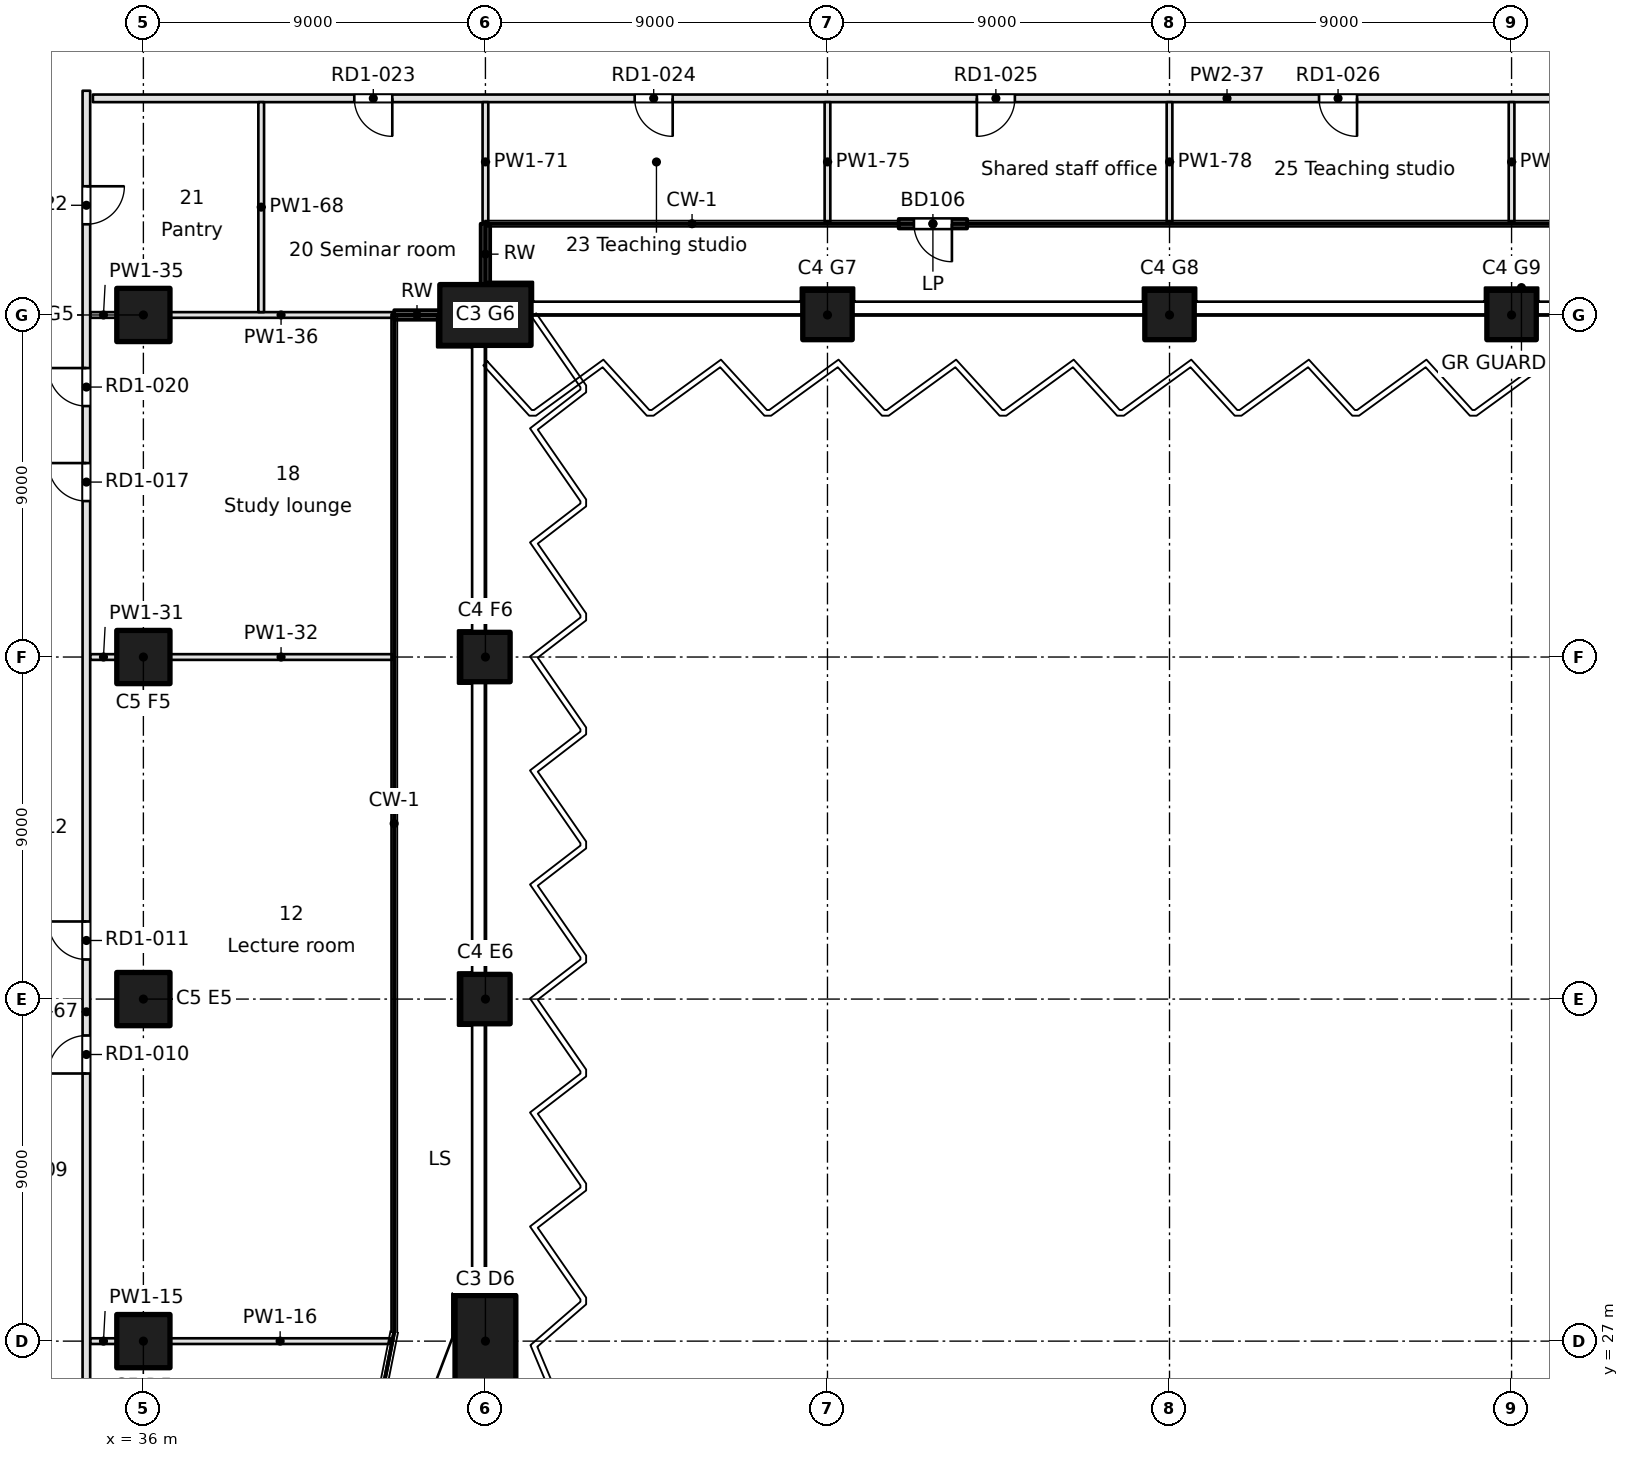
"""IFC4 building model, lengths in metres.
Left out: names, types, materials, properties, quantities, classifications, styles, units other than length and angle.
Written with IfcOpenShell. Run it as: python <this file> out.ifc"""

import sys

from ifc_helpers import new_model, si_unit, direction, frame, frame_2d, origin, origin_2d, place, context, subcontext, project, spatial, rectangle, extrude, element, fill, save


model = new_model("IFC4")
c1 = context("Model", 3, precision=1e-05, world=origin(), true_north=direction((0.0, 1.0)))
c2 = subcontext(c1, "Body", "Model", "MODEL_VIEW")
j1 = project(units=[si_unit("LENGTHUNIT", "METRE"), si_unit("PLANEANGLEUNIT", "RADIAN")], contexts=[c1])
p1 = place(None, origin())
s1 = spatial("IfcSite", under=j1, at=p1, CompositionType="ELEMENT")
p2 = place(p1, origin())
s2 = spatial("IfcBuilding", under=s1, at=p2, CompositionType="ELEMENT")
p3 = place(p2, frame((0.0, 0.0, 46.9)))
s3 = spatial("IfcBuildingStorey", under=s2, at=p3, CompositionType="ELEMENT", Elevation=46.9)
p4 = place(p3, frame((45.0, 27.0, 0.0), z_axis=(0.0, 0.0, 1.0), x_axis=(0.0, 1.0, 0.0)))
e1 = element("IfcColumn", 1, at=p4, inside=s3, PredefinedType="COLUMN", context=c2, shape_type="SweptSolid", body=[
    extrude(rectangle(XDim=2.4, YDim=1.6, at=origin_2d()), origin(), (0.0, 0.0, 1.0), 3.7),
])
for number, where, z_axis, x_axis in (
    (2, (45.0, 36.0, 0.0), (0.0, 0.0, 1.0), (1.0, 0.0, 0.0)),
    (3, (45.0, 45.0, 0.0), (0.0, 0.0, 1.0), (1.0, 0.0, 0.0)),
):
    element("IfcColumn", number, at=place(p3, frame(where, z_axis=z_axis, x_axis=x_axis)), inside=s3, PredefinedType="COLUMN", context=c2, shape_type="SweptSolid", body=[
        extrude(rectangle(XDim=1.3, YDim=1.3, at=origin_2d()), origin(), (0.0, 0.0, 1.0), 3.7),
    ])
p5 = place(p3, frame((45.0, 54.0, 0.0), z_axis=(0.0, 0.0, 1.0), x_axis=(1.0, 0.0, 0.0)))
e4 = element("IfcColumn", 4, at=p5, inside=s3, PredefinedType="COLUMN", context=c2, shape_type="SweptSolid", body=[
    extrude(rectangle(XDim=2.4, YDim=1.6, at=origin_2d()), origin(), (0.0, 0.0, 1.0), 3.7),
])
for number, where, z_axis, x_axis in (
    (5, (54.0, 54.0, 0.0), (0.0, 0.0, 1.0), (1.0, 0.0, 0.0)),
    (6, (63.0, 54.0, 0.0), (0.0, 0.0, 1.0), (1.0, 0.0, 0.0)),
    (7, (72.0, 54.0, 0.0), (0.0, 0.0, 1.0), (1.0, 0.0, 0.0)),
):
    element("IfcColumn", number, at=place(p3, frame(where, z_axis=z_axis, x_axis=x_axis)), inside=s3, PredefinedType="COLUMN", context=c2, shape_type="SweptSolid", body=[
        extrude(rectangle(XDim=1.3, YDim=1.3, at=origin_2d()), origin(), (0.0, 0.0, 1.0), 3.7),
    ])
for number, where, z_axis, x_axis in (
    (8, (36.0, 27.0, 0.0), (0.0, 0.0, 1.0), (1.0, 0.0, 0.0)),
    (9, (36.0, 36.0, 0.0), (0.0, 0.0, 1.0), (1.0, 0.0, 0.0)),
    (10, (36.0, 45.0, 0.0), (0.0, 0.0, 1.0), (1.0, 0.0, 0.0)),
    (11, (36.0, 54.0, 0.0), (0.0, 0.0, 1.0), (1.0, 0.0, 0.0)),
):
    element("IfcColumn", number, at=place(p3, frame(where, z_axis=z_axis, x_axis=x_axis)), inside=s3, PredefinedType="COLUMN", context=c2, shape_type="SweptSolid", body=[
        extrude(rectangle(XDim=1.4, YDim=1.4, at=origin_2d()), origin(), (0.0, 0.0, 1.0), 3.7),
    ])
p6 = place(p3, frame((42.599, 54.0, 0.0), z_axis=(0.0, 0.0, 1.0), x_axis=(0.999999917344, 0.000406586671, 0.0)))
e12 = element("IfcWall", 12, at=p6, inside=s3, PredefinedType="SOLIDWALL", context=c2, shape_type="SweptSolid", body=[
    extrude(rectangle(XDim=1.201, YDim=0.25, at=frame_2d((0.601, 0.0))), origin(), (0.0, 0.0, 1.0), 3.3),
])
p7 = place(p3, frame((44.999, 54.8, 0.0), z_axis=(0.0, 0.0, 1.0), x_axis=(0.000152508767, 0.999999988371, 0.0)))
e13 = element("IfcWall", 13, at=p7, inside=s3, PredefinedType="SOLIDWALL", context=c2, shape_type="SweptSolid", body=[
    extrude(rectangle(XDim=1.601, YDim=0.25, at=frame_2d((0.8, 0.0))), origin(), (0.0, 0.0, 1.0), 3.3),
])
p8 = place(p3, frame((55.874, 56.401, 0.0), z_axis=(0.0, 0.0, 1.0), x_axis=(1.0, 0.0, 0.0)))
e14 = element("IfcWall", 14, at=p8, inside=s3, PredefinedType="SOLIDWALL", context=c2, shape_type="SweptSolid", body=[
    extrude(rectangle(XDim=1.8, YDim=0.25, at=frame_2d((0.9, 0.0))), origin(), (0.0, 0.0, 1.0), 3.3),
])
p9 = place(p8, frame((0.4, 0.0, 0.0)))
e15 = element("IfcOpeningElement", 15, at=p9, cuts=e14, PredefinedType="OPENING", context=c2, shape_type="SweptSolid", body=[
    extrude(rectangle(XDim=1.0, YDim=2.1, at=frame_2d((0.5, 1.05))), frame((0.0, 0.125, 0.0), z_axis=(0.0, -1.0, 0.0), x_axis=(1.0, 0.0, 0.0)), (0.0, 0.0, 1.0), 0.25),
])
p10 = place(p3, frame((34.6, 27.0, 0.0), z_axis=(0.0, 0.0, 1.0), x_axis=(1.0, 0.0, 0.0)))
e16 = element("IfcWall", 16, at=p10, inside=s3, PredefinedType="PARTITIONING", context=c2, shape_type="SweptSolid", body=[
    extrude(rectangle(XDim=0.7, YDim=0.15, at=frame_2d((0.35, 0.0))), origin(), (0.0, 0.0, 1.0), 3.3),
])
p11 = place(p3, frame((36.7, 27.0, 0.0), z_axis=(0.0, 0.0, 1.0), x_axis=(1.0, 0.0, 0.0)))
e17 = element("IfcWall", 17, at=p11, inside=s3, PredefinedType="PARTITIONING", context=c2, shape_type="SweptSolid", body=[
    extrude(rectangle(XDim=5.797, YDim=0.15, at=frame_2d((2.898, 0.0))), origin(), (0.0, 0.0, 1.0), 3.3),
])
p12 = place(p3, frame((34.6, 45.0, 0.0), z_axis=(0.0, 0.0, 1.0), x_axis=(1.0, 0.0, 0.0)))
e18 = element("IfcWall", 18, at=p12, inside=s3, PredefinedType="PARTITIONING", context=c2, shape_type="SweptSolid", body=[
    extrude(rectangle(XDim=0.7, YDim=0.15, at=frame_2d((0.35, 0.0))), origin(), (0.0, 0.0, 1.0), 3.3),
])
p13 = place(p3, frame((36.7, 45.0, 0.0), z_axis=(0.0, 0.0, 1.0), x_axis=(1.0, 0.0, 0.0)))
e19 = element("IfcWall", 19, at=p13, inside=s3, PredefinedType="PARTITIONING", context=c2, shape_type="SweptSolid", body=[
    extrude(rectangle(XDim=5.845, YDim=0.15, at=frame_2d((2.922, 0.0))), origin(), (0.0, 0.0, 1.0), 3.3),
])
p14 = place(p3, frame((34.6, 54.0, 0.0), z_axis=(0.0, 0.0, 1.0), x_axis=(1.0, 0.0, 0.0)))
e20 = element("IfcWall", 20, at=p14, inside=s3, PredefinedType="PARTITIONING", context=c2, shape_type="SweptSolid", body=[
    extrude(rectangle(XDim=0.7, YDim=0.15, at=frame_2d((0.35, 0.0))), origin(), (0.0, 0.0, 1.0), 3.3),
])
p15 = place(p3, frame((36.7, 54.0, 0.0), z_axis=(0.0, 0.0, 1.0), x_axis=(1.0, 0.0, 0.0)))
e21 = element("IfcWall", 21, at=p15, inside=s3, PredefinedType="PARTITIONING", context=c2, shape_type="SweptSolid", body=[
    extrude(rectangle(XDim=5.845, YDim=0.15, at=frame_2d((2.922, 0.0))), origin(), (0.0, 0.0, 1.0), 3.3),
])
p16 = place(p3, frame((94.354, 59.7, 0.0), z_axis=(0.0, 0.0, 1.0), x_axis=(-1.0, 0.0, 0.0)))
e22 = element("IfcWall", 22, at=p16, inside=s3, PredefinedType="PARTITIONING", context=c2, shape_type="SweptSolid", body=[
    extrude(rectangle(XDim=59.682, YDim=0.2, at=frame_2d((29.841, 0.0))), origin(), (0.0, 0.0, 1.0), 3.3),
])
p17 = place(p16, frame((51.805, 0.0, 0.0)))
e23 = element("IfcOpeningElement", 23, at=p17, cuts=e22, PredefinedType="OPENING", context=c2, shape_type="SweptSolid", body=[
    extrude(rectangle(XDim=1.0, YDim=2.1, at=frame_2d((0.5, 1.05))), frame((0.0, 0.1, 0.0), z_axis=(0.0, -1.0, 0.0), x_axis=(1.0, 0.0, 0.0)), (0.0, 0.0, 1.0), 0.2),
])
p18 = place(p16, frame((44.427, 0.0, 0.0)))
e24 = element("IfcOpeningElement", 24, at=p18, cuts=e22, PredefinedType="OPENING", context=c2, shape_type="SweptSolid", body=[
    extrude(rectangle(XDim=1.0, YDim=2.1, at=frame_2d((0.5, 1.05))), frame((0.0, 0.1, 0.0), z_axis=(0.0, -1.0, 0.0), x_axis=(1.0, 0.0, 0.0)), (0.0, 0.0, 1.0), 0.2),
])
p19 = place(p16, frame((35.423, 0.0, 0.0)))
e25 = element("IfcOpeningElement", 25, at=p19, cuts=e22, PredefinedType="OPENING", context=c2, shape_type="SweptSolid", body=[
    extrude(rectangle(XDim=1.0, YDim=2.1, at=frame_2d((0.5, 1.05))), frame((0.0, 0.1, 0.0), z_axis=(0.0, -1.0, 0.0), x_axis=(1.0, 0.0, 0.0)), (0.0, 0.0, 1.0), 0.2),
])
p20 = place(p16, frame((26.42, 0.0, 0.0)))
e26 = element("IfcOpeningElement", 26, at=p20, cuts=e22, PredefinedType="OPENING", context=c2, shape_type="SweptSolid", body=[
    extrude(rectangle(XDim=1.0, YDim=2.1, at=frame_2d((0.5, 1.05))), frame((0.0, 0.1, 0.0), z_axis=(0.0, -1.0, 0.0), x_axis=(1.0, 0.0, 0.0)), (0.0, 0.0, 1.0), 0.2),
])
p21 = place(p16, frame((10.664, 0.0, 0.0)))
e27 = element("IfcOpeningElement", 27, at=p21, cuts=e22, PredefinedType="OPENING", context=c2, shape_type="SweptSolid", body=[
    extrude(rectangle(XDim=1.0, YDim=2.1, at=frame_2d((0.5, 1.05))), frame((0.0, 0.1, 0.0), z_axis=(0.0, -1.0, 0.0), x_axis=(1.0, 0.0, 0.0)), (0.0, 0.0, 1.0), 0.2),
])
p22 = place(p3, frame((34.5, 59.9, 0.0), z_axis=(0.0, 0.0, 1.0), x_axis=(0.0, -1.0, 0.0)))
e28 = element("IfcWall", 28, at=p22, inside=s3, PredefinedType="PARTITIONING", context=c2, shape_type="SweptSolid", body=[
    extrude(rectangle(XDim=48.47, YDim=0.2, at=frame_2d((24.235, 0.0))), origin(), (0.0, 0.0, 1.0), 3.3),
])
p23 = place(p22, frame((44.179, 0.0, 0.0)))
e29 = element("IfcOpeningElement", 29, at=p23, cuts=e28, PredefinedType="OPENING", context=c2, shape_type="SweptSolid", body=[
    extrude(rectangle(XDim=1.8, YDim=2.1, at=frame_2d((0.9, 1.05))), frame((0.0, 0.1, 0.0), z_axis=(0.0, -1.0, 0.0), x_axis=(1.0, 0.0, 0.0)), (0.0, 0.0, 1.0), 0.2),
])
p24 = place(p22, frame((36.92, 0.0, 0.0)))
e30 = element("IfcOpeningElement", 30, at=p24, cuts=e28, PredefinedType="OPENING", context=c2, shape_type="SweptSolid", body=[
    extrude(rectangle(XDim=1.0, YDim=2.1, at=frame_2d((0.5, 1.05))), frame((0.0, 0.1, 0.0), z_axis=(0.0, -1.0, 0.0), x_axis=(1.0, 0.0, 0.0)), (0.0, 0.0, 1.0), 0.2),
])
p25 = place(p22, frame((24.858, 0.0, 0.0)))
e31 = element("IfcOpeningElement", 31, at=p25, cuts=e28, PredefinedType="OPENING", context=c2, shape_type="SweptSolid", body=[
    extrude(rectangle(XDim=1.0, YDim=2.1, at=frame_2d((0.5, 1.05))), frame((0.0, 0.1, 0.0), z_axis=(0.0, -1.0, 0.0), x_axis=(1.0, 0.0, 0.0)), (0.0, 0.0, 1.0), 0.2),
])
p26 = place(p22, frame((21.858, 0.0, 0.0)))
e32 = element("IfcOpeningElement", 32, at=p26, cuts=e28, PredefinedType="OPENING", context=c2, shape_type="SweptSolid", body=[
    extrude(rectangle(XDim=1.0, YDim=2.1, at=frame_2d((0.5, 1.05))), frame((0.0, 0.1, 0.0), z_axis=(0.0, -1.0, 0.0), x_axis=(1.0, 0.0, 0.0)), (0.0, 0.0, 1.0), 0.2),
])
p27 = place(p22, frame((9.797, 0.0, 0.0)))
e33 = element("IfcOpeningElement", 33, at=p27, cuts=e28, PredefinedType="OPENING", context=c2, shape_type="SweptSolid", body=[
    extrude(rectangle(XDim=1.0, YDim=2.1, at=frame_2d((0.5, 1.05))), frame((0.0, 0.1, 0.0), z_axis=(0.0, -1.0, 0.0), x_axis=(1.0, 0.0, 0.0)), (0.0, 0.0, 1.0), 0.2),
])
p28 = place(p22, frame((7.297, 0.0, 0.0)))
e34 = element("IfcOpeningElement", 34, at=p28, cuts=e28, PredefinedType="OPENING", context=c2, shape_type="SweptSolid", body=[
    extrude(rectangle(XDim=1.0, YDim=2.1, at=frame_2d((0.5, 1.05))), frame((0.0, 0.1, 0.0), z_axis=(0.0, -1.0, 0.0), x_axis=(1.0, 0.0, 0.0)), (0.0, 0.0, 1.0), 0.2),
])
p29 = place(p22, frame((2.514, 0.0, 0.0)))
e35 = element("IfcOpeningElement", 35, at=p29, cuts=e28, PredefinedType="OPENING", context=c2, shape_type="SweptSolid", body=[
    extrude(rectangle(XDim=1.0, YDim=2.1, at=frame_2d((0.5, 1.05))), frame((0.0, 0.1, 0.0), z_axis=(0.0, -1.0, 0.0), x_axis=(1.0, 0.0, 0.0)), (0.0, 0.0, 1.0), 0.2),
])
p30 = place(p3, frame((39.1, 59.6, 0.0), z_axis=(0.0, 0.0, 1.0), x_axis=(0.0, -1.0, 0.0)))
e36 = element("IfcWall", 36, at=p30, inside=s3, PredefinedType="PARTITIONING", context=c2, shape_type="SweptSolid", body=[
    extrude(rectangle(XDim=5.525, YDim=0.15, at=frame_2d((2.763, 0.0))), origin(), (0.0, 0.0, 1.0), 3.3),
])
for number, where, z_axis, x_axis in (
    (37, (45.0, 59.6, 0.0), (0.0, 0.0, 1.0), (0.0, -1.0, 0.0)),
    (38, (54.0, 59.6, 0.0), (0.0, 0.0, 1.0), (0.0, -1.0, 0.0)),
    (39, (63.0, 59.6, 0.0), (0.0, 0.0, 1.0), (0.0, -1.0, 0.0)),
    (40, (72.0, 59.6, 0.0), (0.0, 0.0, 1.0), (0.0, -1.0, 0.0)),
):
    element("IfcWall", number, at=place(p3, frame(where, z_axis=z_axis, x_axis=x_axis)), inside=s3, PredefinedType="PARTITIONING", context=c2, shape_type="SweptSolid", body=[
        extrude(rectangle(XDim=3.145, YDim=0.15, at=frame_2d((1.573, 0.0))), origin(), (0.0, 0.0, 1.0), 3.3),
    ])
p31 = place(p9, frame((1.0, 0.0, 0.0), z_axis=(0.0, 0.0, 1.0), x_axis=(-1.0, 0.0, 0.0)))
e41 = element("IfcDoor", 41, at=p31, inside=s3, OperationType="SINGLE_SWING_LEFT", PredefinedType="DOOR", context=c2, shape_type="SweptSolid", body=[
    extrude(rectangle(XDim=1.0, YDim=2.1, at=frame_2d((0.5, 1.05))), frame((0.0, 0.025, 0.0), z_axis=(0.0, -1.0, 0.0), x_axis=(1.0, 0.0, 0.0)), (0.0, 0.0, 1.0), 0.05),
])
fill(e15, e41)
p32 = place(p25, frame((1.0, 0.0, 0.0), z_axis=(0.0, 0.0, 1.0), x_axis=(-1.0, 0.0, 0.0)))
e42 = element("IfcDoor", 42, at=p32, inside=s3, OperationType="SINGLE_SWING_LEFT", PredefinedType="DOOR", context=c2, shape_type="SweptSolid", body=[
    extrude(rectangle(XDim=1.0, YDim=2.1, at=frame_2d((0.5, 1.05))), frame((0.0, 0.025, 0.0), z_axis=(0.0, -1.0, 0.0), x_axis=(1.0, 0.0, 0.0)), (0.0, 0.0, 1.0), 0.05),
])
fill(e31, e42)
p33 = place(p26, frame((1.0, 0.0, 0.0), z_axis=(0.0, 0.0, 1.0), x_axis=(-1.0, 0.0, 0.0)))
e43 = element("IfcDoor", 43, at=p33, inside=s3, OperationType="SINGLE_SWING_RIGHT", PredefinedType="DOOR", context=c2, shape_type="SweptSolid", body=[
    extrude(rectangle(XDim=1.0, YDim=2.1, at=frame_2d((0.5, 1.05))), frame((0.0, 0.025, 0.0), z_axis=(0.0, -1.0, 0.0), x_axis=(1.0, 0.0, 0.0)), (0.0, 0.0, 1.0), 0.05),
])
fill(e32, e43)
p34 = place(p27, frame((1.0, 0.0, 0.0), z_axis=(0.0, 0.0, 1.0), x_axis=(-1.0, 0.0, 0.0)))
e44 = element("IfcDoor", 44, at=p34, inside=s3, OperationType="SINGLE_SWING_RIGHT", PredefinedType="DOOR", context=c2, shape_type="SweptSolid", body=[
    extrude(rectangle(XDim=1.0, YDim=2.1, at=frame_2d((0.5, 1.05))), frame((0.0, 0.025, 0.0), z_axis=(0.0, -1.0, 0.0), x_axis=(1.0, 0.0, 0.0)), (0.0, 0.0, 1.0), 0.05),
])
fill(e33, e44)
p35 = place(p28, frame((1.0, 0.0, 0.0), z_axis=(0.0, 0.0, 1.0), x_axis=(-1.0, 0.0, 0.0)))
e45 = element("IfcDoor", 45, at=p35, inside=s3, OperationType="SINGLE_SWING_RIGHT", PredefinedType="DOOR", context=c2, shape_type="SweptSolid", body=[
    extrude(rectangle(XDim=1.0, YDim=2.1, at=frame_2d((0.5, 1.05))), frame((0.0, 0.025, 0.0), z_axis=(0.0, -1.0, 0.0), x_axis=(1.0, 0.0, 0.0)), (0.0, 0.0, 1.0), 0.05),
])
fill(e34, e45)
p36 = place(p29, origin())
e46 = element("IfcDoor", 46, at=p36, inside=s3, OperationType="SINGLE_SWING_LEFT", PredefinedType="DOOR", context=c2, shape_type="SweptSolid", body=[
    extrude(rectangle(XDim=1.0, YDim=2.1, at=frame_2d((0.5, 1.05))), frame((0.0, 0.025, 0.0), z_axis=(0.0, -1.0, 0.0), x_axis=(1.0, 0.0, 0.0)), (0.0, 0.0, 1.0), 0.05),
])
fill(e35, e46)
p37 = place(p17, origin())
e47 = element("IfcDoor", 47, at=p37, inside=s3, OperationType="SINGLE_SWING_LEFT", PredefinedType="DOOR", context=c2, shape_type="SweptSolid", body=[
    extrude(rectangle(XDim=1.0, YDim=2.1, at=frame_2d((0.5, 1.05))), frame((0.0, 0.025, 0.0), z_axis=(0.0, -1.0, 0.0), x_axis=(1.0, 0.0, 0.0)), (0.0, 0.0, 1.0), 0.05),
])
fill(e23, e47)
p38 = place(p18, origin())
e48 = element("IfcDoor", 48, at=p38, inside=s3, OperationType="SINGLE_SWING_LEFT", PredefinedType="DOOR", context=c2, shape_type="SweptSolid", body=[
    extrude(rectangle(XDim=1.0, YDim=2.1, at=frame_2d((0.5, 1.05))), frame((0.0, 0.025, 0.0), z_axis=(0.0, -1.0, 0.0), x_axis=(1.0, 0.0, 0.0)), (0.0, 0.0, 1.0), 0.05),
])
fill(e24, e48)
p39 = place(p19, origin())
e49 = element("IfcDoor", 49, at=p39, inside=s3, OperationType="SINGLE_SWING_RIGHT", PredefinedType="DOOR", context=c2, shape_type="SweptSolid", body=[
    extrude(rectangle(XDim=1.0, YDim=2.1, at=frame_2d((0.5, 1.05))), frame((0.0, 0.025, 0.0), z_axis=(0.0, -1.0, 0.0), x_axis=(1.0, 0.0, 0.0)), (0.0, 0.0, 1.0), 0.05),
])
fill(e25, e49)
p40 = place(p20, origin())
e50 = element("IfcDoor", 50, at=p40, inside=s3, OperationType="SINGLE_SWING_LEFT", PredefinedType="DOOR", context=c2, shape_type="SweptSolid", body=[
    extrude(rectangle(XDim=1.0, YDim=2.1, at=frame_2d((0.5, 1.05))), frame((0.0, 0.025, 0.0), z_axis=(0.0, -1.0, 0.0), x_axis=(1.0, 0.0, 0.0)), (0.0, 0.0, 1.0), 0.05),
])
fill(e26, e50)
save(model, sys.argv[1])
